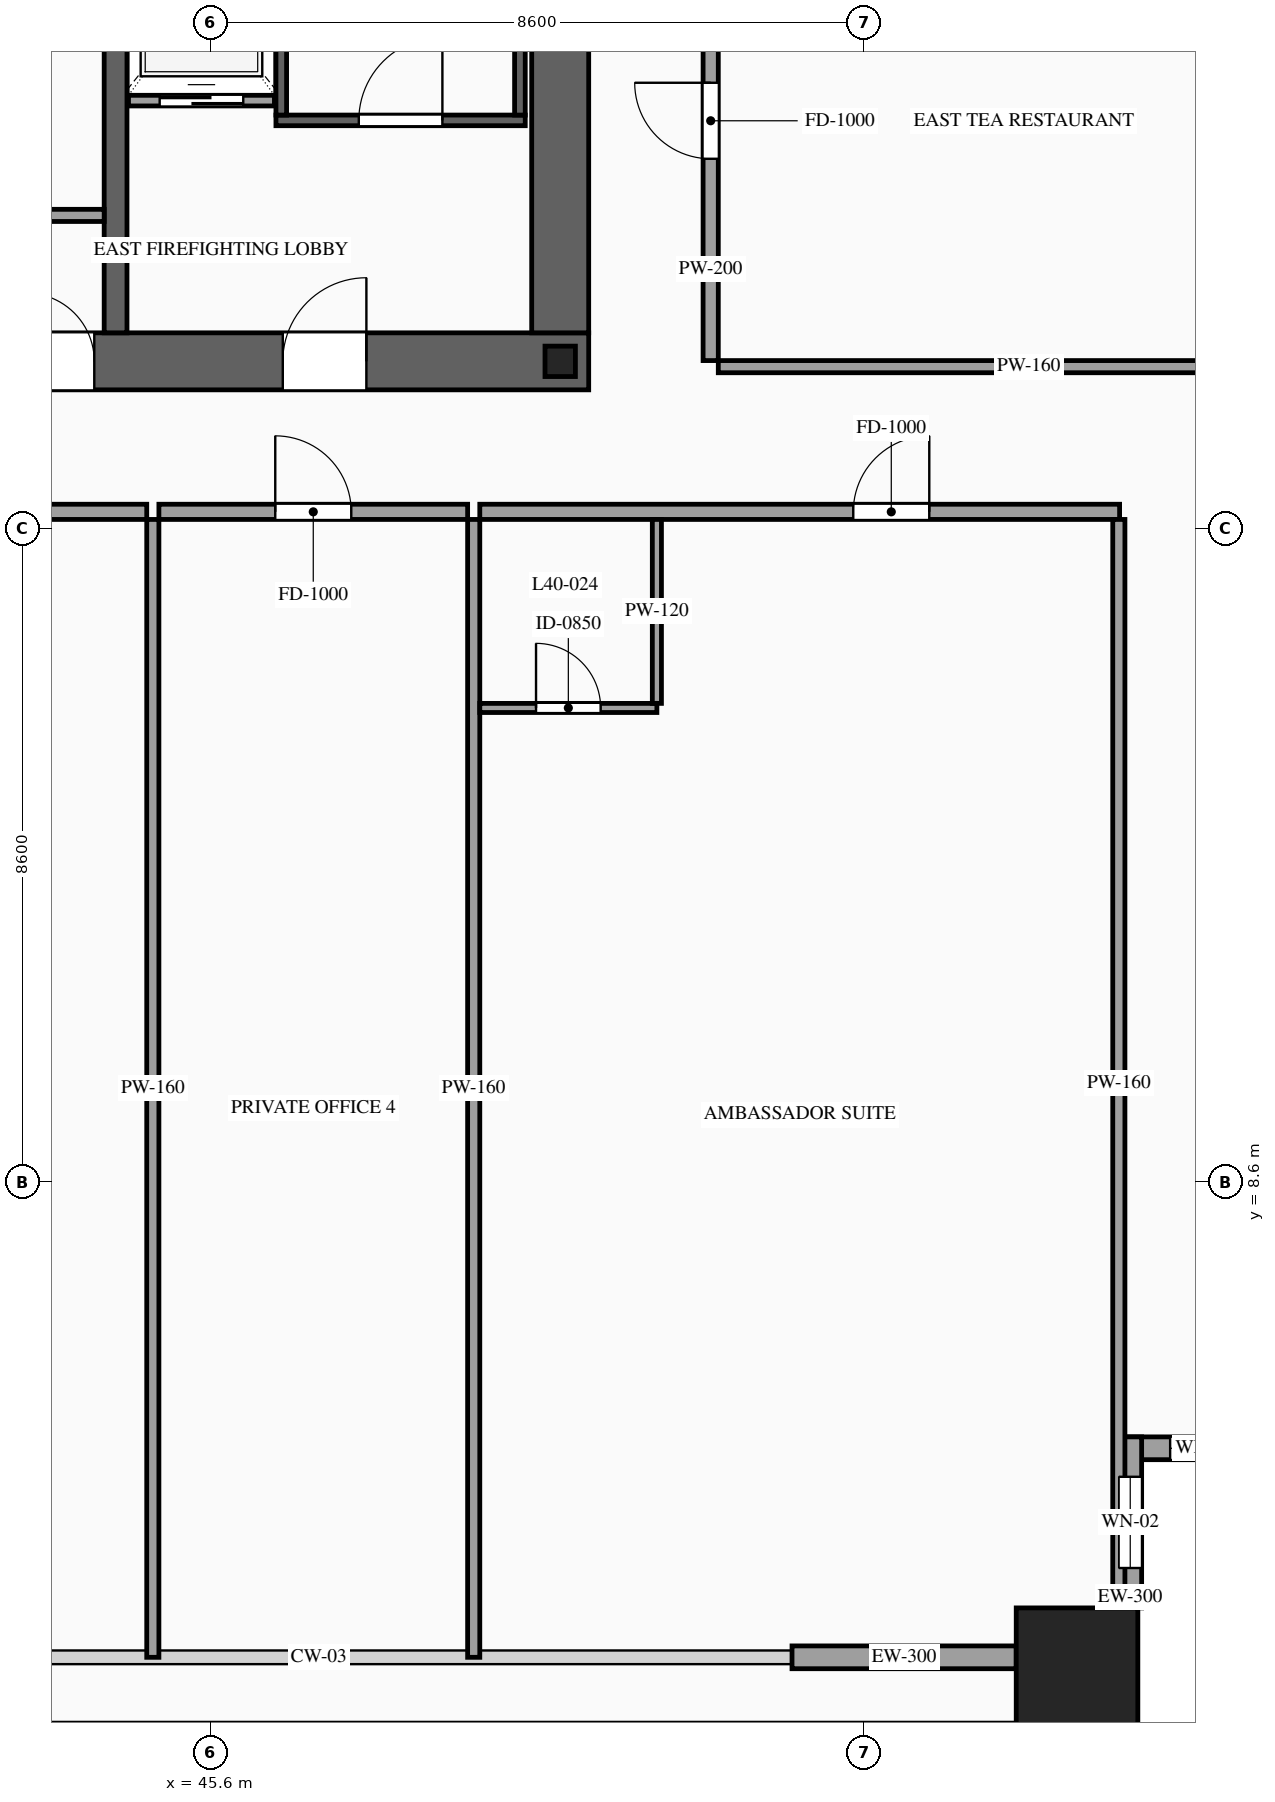
"""IFC4 building model, lengths in metres.
Left out: names, types, materials, properties, quantities, classifications, styles, units other than length and angle.
Written with IfcOpenShell. Run it as: python <this file> out.ifc"""

import sys

from ifc_helpers import new_model, si_unit, direction, frame, frame_2d, origin, origin_2d, place, context, subcontext, project, spatial, rectangle, hollow_rectangle, i_section, extrude, source, transform, mapped, element, fill, save


model = new_model("IFC4")
c1 = context("Model", 3, precision=1e-05, world=origin(), true_north=direction((0.0, 1.0)))
c2 = subcontext(c1, "Body", "Model", "MODEL_VIEW")
j1 = project(units=[si_unit("LENGTHUNIT", "METRE"), si_unit("PLANEANGLEUNIT", "RADIAN")], contexts=[c1])
p1 = place(None, origin())
s1 = spatial("IfcSite", under=j1, at=p1, CompositionType="ELEMENT")
p2 = place(p1, origin())
s2 = spatial("IfcBuilding", under=s1, at=p2, CompositionType="ELEMENT")
p3 = place(p2, frame((0.0, 0.0, 152.4)))
s3 = spatial("IfcBuildingStorey", under=s2, at=p3, CompositionType="ELEMENT", Elevation=152.4)
p4 = place(p3, frame((23.425, 19.4, 0.0), z_axis=(0.0, 0.0, 1.0), x_axis=(1.0, 0.0, 0.0)))
e1 = element("IfcWall", 1, at=p4, inside=s3, PredefinedType="SHEAR", context=c2, shape_type="SweptSolid", body=[
    extrude(rectangle(XDim=27.15, YDim=0.75, at=frame_2d((13.575, 0.0))), origin(), (0.0, 0.0, 1.0), 3.6),
])
p5 = place(p4, frame((2.025, 0.0, 0.0)))
e2 = element("IfcOpeningElement", 2, at=p5, cuts=e1, PredefinedType="OPENING", context=c2, shape_type="SweptSolid", body=[
    extrude(rectangle(XDim=1.1, YDim=2.2, at=frame_2d((0.55, 1.1))), frame((0.0, 0.39, 0.0), z_axis=(0.0, -1.0, 0.0), x_axis=(1.0, 0.0, 0.0)), (0.0, 0.0, 1.0), 0.78),
])
p6 = place(p4, frame((9.925, 0.0, 0.0)))
e3 = element("IfcOpeningElement", 3, at=p6, cuts=e1, PredefinedType="OPENING", context=c2, shape_type="SweptSolid", body=[
    extrude(rectangle(XDim=1.1, YDim=2.2, at=frame_2d((0.55, 1.1))), frame((0.0, 0.39, 0.0), z_axis=(0.0, -1.0, 0.0), x_axis=(1.0, 0.0, 0.0)), (0.0, 0.0, 1.0), 0.78),
])
p7 = place(p4, frame((23.125, 0.0, 0.0)))
e4 = element("IfcOpeningElement", 4, at=p7, cuts=e1, PredefinedType="OPENING", context=c2, shape_type="SweptSolid", body=[
    extrude(rectangle(XDim=1.1, YDim=2.2, at=frame_2d((0.55, 1.1))), frame((0.0, 0.39, 0.0), z_axis=(0.0, -1.0, 0.0), x_axis=(1.0, 0.0, 0.0)), (0.0, 0.0, 1.0), 0.78),
])
p8 = place(p4, frame((19.745, 0.0, 0.0)))
e5 = element("IfcOpeningElement", 5, at=p8, cuts=e1, PredefinedType="OPENING", context=c2, shape_type="SweptSolid", body=[
    extrude(rectangle(XDim=0.9, YDim=2.15, at=frame_2d((0.45, 1.075))), frame((0.0, 0.39, 0.0), z_axis=(0.0, -1.0, 0.0), x_axis=(1.0, 0.0, 0.0)), (0.0, 0.0, 1.0), 0.78),
])
p9 = place(p4, frame((18.305, 0.0, 0.0)))
e6 = element("IfcOpeningElement", 6, at=p9, cuts=e1, PredefinedType="OPENING", context=c2, shape_type="SweptSolid", body=[
    extrude(rectangle(XDim=0.9, YDim=2.15, at=frame_2d((0.45, 1.075))), frame((0.0, 0.39, 0.0), z_axis=(0.0, -1.0, 0.0), x_axis=(1.0, 0.0, 0.0)), (0.0, 0.0, 1.0), 0.78),
])
m1 = source(origin(), c2, "Body", "SweptSolid", [
    extrude(rectangle(XDim=12.05, YDim=0.75, at=frame_2d((6.025, 0.0))), origin(), (0.0, 0.0, 1.0), 3.6),
])
p10 = place(p3, frame((50.2, 19.775, 0.0), z_axis=(0.0, 0.0, 1.0), x_axis=(0.0, 1.0, 0.0)))
e7 = element("IfcWall", 7, at=p10, inside=s3, PredefinedType="SHEAR", context=c2, shape_type="MappedRepresentation", body=[
    mapped(m1, transform((0.0, 0.0, 0.0), scale=1.0)),
])
m2 = source(origin(), c2, "Body", "SweptSolid", [
    extrude(rectangle(XDim=12.05, YDim=0.3, at=frame_2d((6.025, 0.0))), origin(), (0.0, 0.0, 1.0), 3.6),
])
p11 = place(p3, frame((44.35, 19.775, 0.0), z_axis=(0.0, 0.0, 1.0), x_axis=(0.0, 1.0, 0.0)))
e8 = element("IfcWall", 8, at=p11, inside=s3, PredefinedType="SOLIDWALL", context=c2, shape_type="MappedRepresentation", body=[
    mapped(m2, transform((0.0, 0.0, 0.0), scale=1.0)),
])
m3 = source(origin(), c2, "Body", "SweptSolid", [
    extrude(i_section(OverallWidth=0.4, OverallDepth=0.4, WebThickness=0.013, FlangeThickness=0.021, at=origin_2d()), origin(), (0.0, 0.0, 1.0), 3.6),
])
p12 = place(p3, frame((50.2, 19.4, 0.0), z_axis=(0.0, 0.0, 1.0), x_axis=(1.0, 0.0, 0.0)))
e9 = element("IfcColumn", 9, at=p12, inside=s3, PredefinedType="COLUMN", context=c2, shape_type="MappedRepresentation", body=[
    mapped(m3, transform((0.0, 0.0, 0.0), scale=1.0)),
])
m4 = source(origin(), c2, "Body", "SweptSolid", [
    extrude(hollow_rectangle(XDim=1.6, YDim=1.6, WallThickness=0.07, at=origin_2d()), origin(), (0.0, 0.0, 1.0), 3.6),
])
p13 = place(p3, frame((57.0, 2.2, 0.0), z_axis=(0.0, 0.0, 1.0), x_axis=(1.0, 0.0, 0.0)))
e10 = element("IfcColumn", 10, at=p13, inside=s3, PredefinedType="COLUMN", context=c2, shape_type="MappedRepresentation", body=[
    mapped(m4, transform((0.0, 0.0, 0.0), scale=1.0)),
])
p14 = place(p3, frame((57.55, 5.1, 0.0), z_axis=(0.0, 0.0, 1.0), x_axis=(1.0, 0.0, 0.0)))
e11 = element("IfcWall", 11, at=p14, inside=s3, PredefinedType="SOLIDWALL", context=c2, shape_type="SweptSolid", body=[
    extrude(rectangle(XDim=2.25, YDim=0.3, at=frame_2d((1.125, 0.0))), origin(), (0.0, 0.0, 1.0), 3.38),
])
p15 = place(p14, frame((0.675, 0.0, 0.85)))
e12 = element("IfcOpeningElement", 12, at=p15, cuts=e11, PredefinedType="OPENING", context=c2, shape_type="SweptSolid", body=[
    extrude(rectangle(XDim=0.9, YDim=1.5, at=frame_2d((0.45, 0.75))), frame((0.0, 0.165, 0.0), z_axis=(0.0, -1.0, 0.0), x_axis=(1.0, 0.0, 0.0)), (0.0, 0.0, 1.0), 0.33),
])
p16 = place(p3, frame((57.7, 3.0, 0.0), z_axis=(0.0, 0.0, 1.0), x_axis=(0.0, 1.0, 0.0)))
e13 = element("IfcWall", 13, at=p16, inside=s3, PredefinedType="SOLIDWALL", context=c2, shape_type="SweptSolid", body=[
    extrude(rectangle(XDim=2.25, YDim=0.3, at=frame_2d((1.125, 0.0))), origin(), (0.0, 0.0, 1.0), 3.38),
])
p17 = place(p16, frame((0.525, 0.0, 0.85)))
e14 = element("IfcOpeningElement", 14, at=p17, cuts=e13, PredefinedType="OPENING", context=c2, shape_type="SweptSolid", body=[
    extrude(rectangle(XDim=1.2, YDim=2.1, at=frame_2d((0.6, 1.05))), frame((0.0, 0.165, 0.0), z_axis=(0.0, -1.0, 0.0), x_axis=(1.0, 0.0, 0.0)), (0.0, 0.0, 1.0), 0.33),
])
m5 = source(origin(), c2, "Body", "SweptSolid", [
    extrude(rectangle(XDim=2.95, YDim=0.3, at=frame_2d((1.475, 0.0))), origin(), (0.0, 0.0, 1.0), 2.775),
])
p18 = place(p3, frame((53.25, 2.35, 0.0), z_axis=(0.0, 0.0, 1.0), x_axis=(1.0, 0.0, 0.0)))
e15 = element("IfcWall", 15, at=p18, inside=s3, PredefinedType="SOLIDWALL", context=c2, shape_type="MappedRepresentation", body=[
    mapped(m5, transform((0.0, 0.0, 0.0), scale=1.0)),
])
p19 = place(p3, frame((44.52, 22.83, 0.0), z_axis=(0.0, 0.0, 1.0), x_axis=(1.0, 0.0, 0.0)))
e16 = element("IfcWall", 16, at=p19, inside=s3, PredefinedType="SOLIDWALL", context=c2, shape_type="SweptSolid", body=[
    extrude(rectangle(XDim=1.92, YDim=0.14, at=frame_2d((0.96, 0.0))), origin(), (0.0, 0.0, 1.0), 3.38),
])
p20 = place(p19, frame((0.41, 0.0, 0.0)))
e17 = element("IfcOpeningElement", 17, at=p20, cuts=e16, PredefinedType="OPENING", context=c2, shape_type="SweptSolid", body=[
    extrude(rectangle(XDim=1.1, YDim=2.2, at=frame_2d((0.55, 1.1))), frame((0.0, 0.085, 0.0), z_axis=(0.0, -1.0, 0.0), x_axis=(1.0, 0.0, 0.0)), (0.0, 0.0, 1.0), 0.17),
])
p21 = place(p3, frame((46.46, 22.57, 0.0), z_axis=(0.0, 0.0, 1.0), x_axis=(1.0, 0.0, 0.0)))
e18 = element("IfcWall", 18, at=p21, inside=s3, PredefinedType="SOLIDWALL", context=c2, shape_type="SweptSolid", body=[
    extrude(rectangle(XDim=3.28, YDim=0.14, at=frame_2d((1.64, 0.0))), origin(), (0.0, 0.0, 1.0), 3.38),
])
p22 = place(p21, frame((1.09, 0.0, 0.0)))
e19 = element("IfcOpeningElement", 19, at=p22, cuts=e18, PredefinedType="OPENING", context=c2, shape_type="SweptSolid", body=[
    extrude(rectangle(XDim=1.1, YDim=2.2, at=frame_2d((0.55, 1.1))), frame((0.0, 0.085, 0.0), z_axis=(0.0, -1.0, 0.0), x_axis=(1.0, 0.0, 0.0)), (0.0, 0.0, 1.0), 0.17),
])
m6 = source(origin(), c2, "Body", "SweptSolid", [
    extrude(rectangle(XDim=8.94, YDim=0.14, at=frame_2d((4.47, 0.0))), origin(), (0.0, 0.0, 1.0), 3.38),
])
for number, where, z_axis, x_axis in (
    (20, (46.53, 22.64, 0.0), (0.0, 0.0, 1.0), (0.0, 1.0, 0.0)),
    (21, (49.67, 22.64, 0.0), (0.0, 0.0, 1.0), (0.0, 1.0, 0.0)),
):
    element("IfcWall", number, at=place(p3, frame(where, z_axis=z_axis, x_axis=x_axis)), inside=s3, PredefinedType="SOLIDWALL", context=c2, shape_type="MappedRepresentation", body=[
        mapped(m6, transform((0.0, 0.0, 0.0), scale=1.0)),
    ])
m7 = source(origin(), c2, "Body", "SweptSolid", [
    extrude(rectangle(XDim=1.17, YDim=0.16, at=frame_2d((0.585, 0.0))), origin(), (0.0, 0.0, 1.0), 3.38),
])
p23 = place(p3, frame((43.03, 21.32, 0.0), z_axis=(0.0, 0.0, 1.0), x_axis=(1.0, 0.0, 0.0)))
e22 = element("IfcWall", 22, at=p23, inside=s3, PredefinedType="PARTITIONING", context=c2, shape_type="MappedRepresentation", body=[
    mapped(m7, transform((0.0, 0.0, 0.0), scale=1.0)),
])
p24 = place(p3, frame((35.435, 17.42, 0.0), z_axis=(0.0, 0.0, 1.0), x_axis=(1.0, 0.0, 0.0)))
e23 = element("IfcWall", 23, at=p24, inside=s3, PredefinedType="PARTITIONING", context=c2, shape_type="SweptSolid", body=[
    extrude(rectangle(XDim=9.325, YDim=0.2, at=frame_2d((4.663, 0.0))), origin(), (0.0, 0.0, 1.0), 3.38),
])
p25 = place(p24, frame((4.162, 0.0, 0.0)))
e24 = element("IfcOpeningElement", 24, at=p25, cuts=e23, PredefinedType="OPENING", context=c2, shape_type="SweptSolid", body=[
    extrude(rectangle(XDim=1.0, YDim=2.2, at=frame_2d((0.5, 1.1))), frame((0.0, 0.115, 0.0), z_axis=(0.0, -1.0, 0.0), x_axis=(1.0, 0.0, 0.0)), (0.0, 0.0, 1.0), 0.23),
])
m8 = source(origin(), c2, "Body", "SweptSolid", [
    extrude(rectangle(XDim=14.97, YDim=0.16, at=frame_2d((7.485, 0.0))), origin(), (0.0, 0.0, 1.0), 3.38),
])
p26 = place(p3, frame((44.84, 2.35, 0.0), z_axis=(0.0, 0.0, 1.0), x_axis=(0.0, 1.0, 0.0)))
e25 = element("IfcWall", 25, at=p26, inside=s3, PredefinedType="PARTITIONING", context=c2, shape_type="MappedRepresentation", body=[
    mapped(m8, transform((0.0, 0.0, 0.0), scale=1.0)),
])
p27 = place(p3, frame((44.92, 17.42, 0.0), z_axis=(0.0, 0.0, 1.0), x_axis=(1.0, 0.0, 0.0)))
e26 = element("IfcWall", 26, at=p27, inside=s3, PredefinedType="PARTITIONING", context=c2, shape_type="SweptSolid", body=[
    extrude(rectangle(XDim=4.062, YDim=0.2, at=frame_2d((2.031, 0.0))), origin(), (0.0, 0.0, 1.0), 3.38),
])
p28 = place(p27, frame((1.531, 0.0, 0.0)))
e27 = element("IfcOpeningElement", 27, at=p28, cuts=e26, PredefinedType="OPENING", context=c2, shape_type="SweptSolid", body=[
    extrude(rectangle(XDim=1.0, YDim=2.2, at=frame_2d((0.5, 1.1))), frame((0.0, 0.115, 0.0), z_axis=(0.0, -1.0, 0.0), x_axis=(1.0, 0.0, 0.0)), (0.0, 0.0, 1.0), 0.23),
])
p29 = place(p3, frame((49.062, 2.35, 0.0), z_axis=(0.0, 0.0, 1.0), x_axis=(0.0, 1.0, 0.0)))
e28 = element("IfcWall", 28, at=p29, inside=s3, PredefinedType="PARTITIONING", context=c2, shape_type="MappedRepresentation", body=[
    mapped(m8, transform((0.0, 0.0, 0.0), scale=1.0)),
])
p30 = place(p3, frame((49.142, 17.42, 0.0), z_axis=(0.0, 0.0, 1.0), x_axis=(1.0, 0.0, 0.0)))
e29 = element("IfcWall", 29, at=p30, inside=s3, PredefinedType="PARTITIONING", context=c2, shape_type="SweptSolid", body=[
    extrude(rectangle(XDim=8.418, YDim=0.2, at=frame_2d((4.209, 0.0))), origin(), (0.0, 0.0, 1.0), 3.38),
])
p31 = place(p30, frame((4.914, 0.0, 0.0)))
e30 = element("IfcOpeningElement", 30, at=p31, cuts=e29, PredefinedType="OPENING", context=c2, shape_type="SweptSolid", body=[
    extrude(rectangle(XDim=1.0, YDim=2.2, at=frame_2d((0.5, 1.1))), frame((0.0, 0.115, 0.0), z_axis=(0.0, -1.0, 0.0), x_axis=(1.0, 0.0, 0.0)), (0.0, 0.0, 1.0), 0.23),
])
m9 = source(origin(), c2, "Body", "SweptSolid", [
    extrude(rectangle(XDim=14.82, YDim=0.16, at=frame_2d((7.41, 0.0))), origin(), (0.0, 0.0, 1.0), 3.38),
])
p32 = place(p3, frame((57.55, 2.5, 0.0), z_axis=(0.0, 0.0, 1.0), x_axis=(0.0, 1.0, 0.0)))
e31 = element("IfcWall", 31, at=p32, inside=s3, PredefinedType="PARTITIONING", context=c2, shape_type="MappedRepresentation", body=[
    mapped(m9, transform((0.0, 0.0, 0.0), scale=1.0)),
])
p33 = place(p3, frame((49.142, 14.84, 0.0), z_axis=(0.0, 0.0, 1.0), x_axis=(1.0, 0.0, 0.0)))
e32 = element("IfcWall", 32, at=p33, inside=s3, PredefinedType="PARTITIONING", context=c2, shape_type="SweptSolid", body=[
    extrude(rectangle(XDim=2.33, YDim=0.12, at=frame_2d((1.165, 0.0))), origin(), (0.0, 0.0, 1.0), 3.38),
])
p34 = place(p33, frame((0.74, 0.0, 0.0)))
e33 = element("IfcOpeningElement", 33, at=p34, cuts=e32, PredefinedType="OPENING", context=c2, shape_type="SweptSolid", body=[
    extrude(rectangle(XDim=0.85, YDim=2.1, at=frame_2d((0.425, 1.05))), frame((0.0, 0.075, 0.0), z_axis=(0.0, -1.0, 0.0), x_axis=(1.0, 0.0, 0.0)), (0.0, 0.0, 1.0), 0.15),
])
m10 = source(origin(), c2, "Body", "SweptSolid", [
    extrude(rectangle(XDim=2.42, YDim=0.12, at=frame_2d((1.21, 0.0))), origin(), (0.0, 0.0, 1.0), 3.38),
])
p35 = place(p3, frame((51.472, 14.9, 0.0), z_axis=(0.0, 0.0, 1.0), x_axis=(0.0, 1.0, 0.0)))
e34 = element("IfcWall", 34, at=p35, inside=s3, PredefinedType="PARTITIONING", context=c2, shape_type="MappedRepresentation", body=[
    mapped(m10, transform((0.0, 0.0, 0.0), scale=1.0)),
])
p36 = place(p3, frame((52.18, 19.41, 0.0), z_axis=(0.0, 0.0, 1.0), x_axis=(0.0, 1.0, 0.0)))
e35 = element("IfcWall", 35, at=p36, inside=s3, PredefinedType="PARTITIONING", context=c2, shape_type="SweptSolid", body=[
    extrude(rectangle(XDim=6.31, YDim=0.2, at=frame_2d((3.155, 0.0))), origin(), (0.0, 0.0, 1.0), 3.38),
])
p37 = place(p36, frame((2.655, 0.0, 0.0)))
e36 = element("IfcOpeningElement", 36, at=p37, cuts=e35, PredefinedType="OPENING", context=c2, shape_type="SweptSolid", body=[
    extrude(rectangle(XDim=1.0, YDim=2.2, at=frame_2d((0.5, 1.1))), frame((0.0, 0.115, 0.0), z_axis=(0.0, -1.0, 0.0), x_axis=(1.0, 0.0, 0.0)), (0.0, 0.0, 1.0), 0.23),
])
m11 = source(origin(), c2, "Body", "SweptSolid", [
    extrude(rectangle(XDim=8.17, YDim=0.16, at=frame_2d((4.085, 0.0))), origin(), (0.0, 0.0, 1.0), 2.875),
])
p38 = place(p3, frame((52.28, 19.33, 0.0), z_axis=(0.0, 0.0, 1.0), x_axis=(1.0, 0.0, 0.0)))
e37 = element("IfcWall", 37, at=p38, inside=s3, PredefinedType="PARTITIONING", context=c2, shape_type="MappedRepresentation", body=[
    mapped(m11, transform((0.0, 0.0, 0.0), scale=1.0)),
])
m12 = source(origin(), c2, "Body", "SweptSolid", [
    extrude(rectangle(XDim=0.9, YDim=1.5, at=frame_2d((0.45, 0.75))), frame((0.0, 0.03, 0.0), z_axis=(0.0, -1.0, 0.0), x_axis=(1.0, 0.0, 0.0)), (0.0, 0.0, 1.0), 0.06),
])
p39 = place(p15, origin())
e38 = element("IfcWindow", 38, at=p39, inside=s3, PartitioningType="SINGLE_PANEL", PredefinedType="WINDOW", context=c2, shape_type="MappedRepresentation", body=[
    mapped(m12, transform((0.0, 0.0, 0.0), scale=1.0)),
])
fill(e12, e38)
m13 = source(origin(), c2, "Body", "SweptSolid", [
    extrude(rectangle(XDim=1.2, YDim=2.1, at=frame_2d((0.6, 1.05))), frame((0.0, 0.03, 0.0), z_axis=(0.0, -1.0, 0.0), x_axis=(1.0, 0.0, 0.0)), (0.0, 0.0, 1.0), 0.06),
])
p40 = place(p17, origin())
e39 = element("IfcWindow", 39, at=p40, inside=s3, PartitioningType="SINGLE_PANEL", PredefinedType="WINDOW", context=c2, shape_type="MappedRepresentation", body=[
    mapped(m13, transform((0.0, 0.0, 0.0), scale=1.0)),
])
fill(e14, e39)
m14 = source(origin(), c2, "Body", "SweptSolid", [
    extrude(rectangle(XDim=1.1, YDim=2.2, at=frame_2d((0.55, 1.1))), frame((0.0, 0.025, 0.0), z_axis=(0.0, -1.0, 0.0), x_axis=(1.0, 0.0, 0.0)), (0.0, 0.0, 1.0), 0.05),
])
p41 = place(p20, origin())
e40 = element("IfcDoor", 40, at=p41, inside=s3, OperationType="SLIDING_TO_RIGHT", PredefinedType="DOOR", context=c2, shape_type="MappedRepresentation", body=[
    mapped(m14, transform((0.0, 0.0, 0.0), scale=1.0)),
])
fill(e17, e40)
m15 = source(origin(), c2, "Body", "SweptSolid", [
    extrude(rectangle(XDim=1.1, YDim=2.2, at=frame_2d((0.55, 1.1))), frame((0.0, 0.025, 0.0), z_axis=(0.0, -1.0, 0.0), x_axis=(1.0, 0.0, 0.0)), (0.0, 0.0, 1.0), 0.05),
])
p42 = place(p22, origin())
e41 = element("IfcDoor", 41, at=p42, inside=s3, OperationType="SINGLE_SWING_RIGHT", PredefinedType="DOOR", context=c2, shape_type="MappedRepresentation", body=[
    mapped(m15, transform((0.0, 0.0, 0.0), scale=1.0)),
])
fill(e19, e41)
p43 = place(p7, origin())
e42 = element("IfcDoor", 42, at=p43, inside=s3, OperationType="SINGLE_SWING_RIGHT", PredefinedType="DOOR", context=c2, shape_type="MappedRepresentation", body=[
    mapped(m15, transform((0.0, 0.0, 0.0), scale=1.0)),
])
fill(e4, e42)
m16 = source(origin(), c2, "Body", "SweptSolid", [
    extrude(rectangle(XDim=0.9, YDim=2.15, at=frame_2d((0.45, 1.075))), frame((0.0, 0.025, 0.0), z_axis=(0.0, -1.0, 0.0), x_axis=(1.0, 0.0, 0.0)), (0.0, 0.0, 1.0), 0.05),
])
p44 = place(p8, origin())
e43 = element("IfcDoor", 43, at=p44, inside=s3, OperationType="SINGLE_SWING_LEFT", PredefinedType="DOOR", context=c2, shape_type="MappedRepresentation", body=[
    mapped(m16, transform((0.0, 0.0, 0.0), scale=1.0)),
])
fill(e5, e43)
m17 = source(origin(), c2, "Body", "SweptSolid", [
    extrude(rectangle(XDim=1.0, YDim=2.2, at=frame_2d((0.5, 1.1))), frame((0.0, 0.025, 0.0), z_axis=(0.0, -1.0, 0.0), x_axis=(1.0, 0.0, 0.0)), (0.0, 0.0, 1.0), 0.05),
])
p45 = place(p28, origin())
e44 = element("IfcDoor", 44, at=p45, inside=s3, OperationType="SINGLE_SWING_LEFT", PredefinedType="DOOR", context=c2, shape_type="MappedRepresentation", body=[
    mapped(m17, transform((0.0, 0.0, 0.0), scale=1.0)),
])
fill(e27, e44)
p46 = place(p31, origin())
e45 = element("IfcDoor", 45, at=p46, inside=s3, OperationType="SINGLE_SWING_RIGHT", PredefinedType="DOOR", context=c2, shape_type="MappedRepresentation", body=[
    mapped(m17, transform((0.0, 0.0, 0.0), scale=1.0)),
])
fill(e30, e45)
m18 = source(origin(), c2, "Body", "SweptSolid", [
    extrude(rectangle(XDim=0.85, YDim=2.1, at=frame_2d((0.425, 1.05))), frame((0.0, 0.025, 0.0), z_axis=(0.0, -1.0, 0.0), x_axis=(1.0, 0.0, 0.0)), (0.0, 0.0, 1.0), 0.05),
])
p47 = place(p34, origin())
e46 = element("IfcDoor", 46, at=p47, inside=s3, OperationType="SINGLE_SWING_LEFT", PredefinedType="DOOR", context=c2, shape_type="MappedRepresentation", body=[
    mapped(m18, transform((0.0, 0.0, 0.0), scale=1.0)),
])
fill(e33, e46)
p48 = place(p37, origin())
e47 = element("IfcDoor", 47, at=p48, inside=s3, OperationType="SINGLE_SWING_RIGHT", PredefinedType="DOOR", context=c2, shape_type="MappedRepresentation", body=[
    mapped(m17, transform((0.0, 0.0, 0.0), scale=1.0)),
])
fill(e36, e47)
save(model, sys.argv[1])
